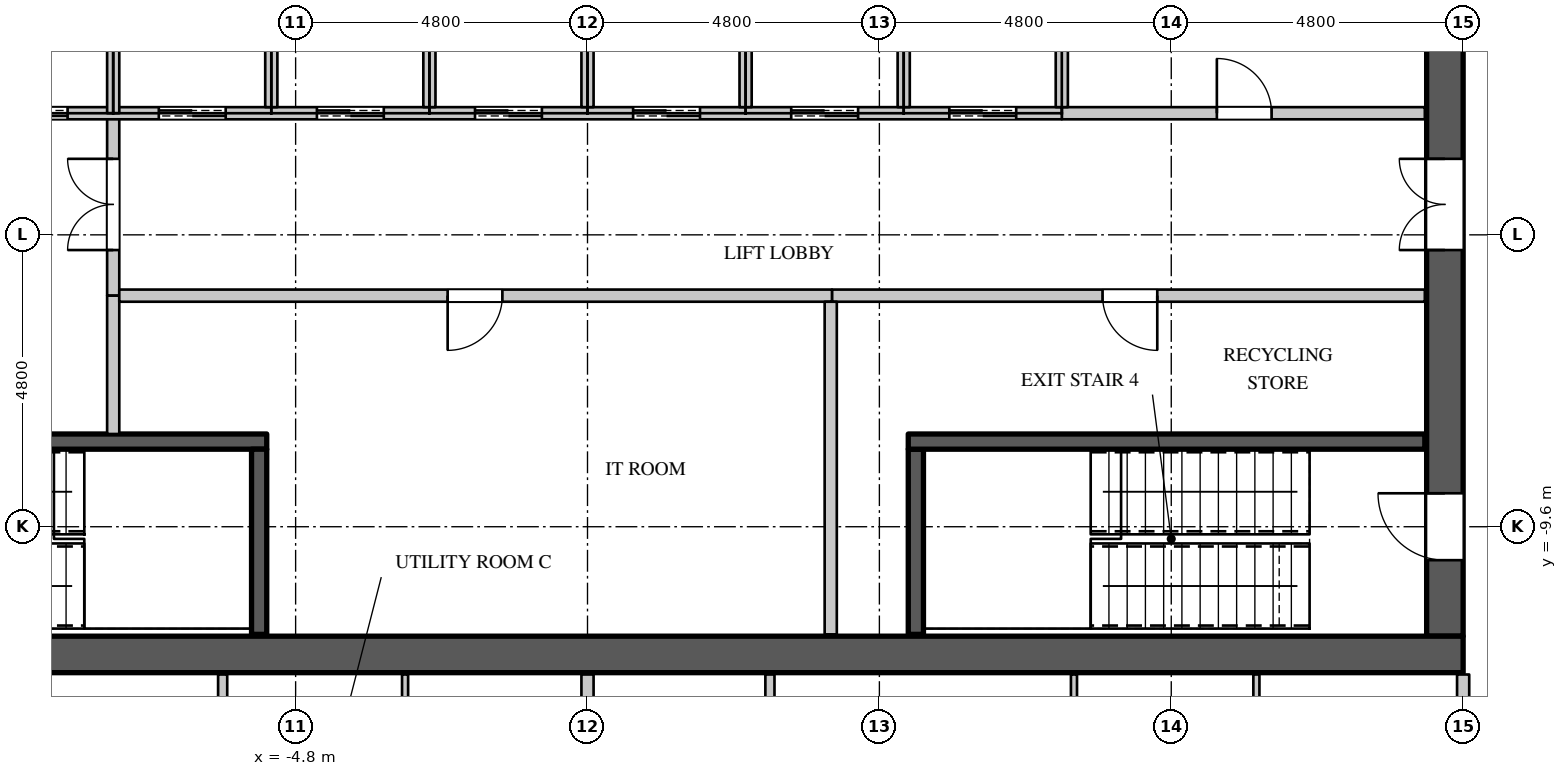
"""IFC4 building model, lengths in metres.
Left out: names, types, materials, properties, quantities, classifications, styles, units other than length and angle.
Written with IfcOpenShell. Run it as: python <this file> out.ifc"""

import sys

from ifc_helpers import new_model, si_unit, direction, frame, frame_2d, origin, place, context, subcontext, project, spatial, rectangle, extrude, element, fill, save


model = new_model("IFC4")
c1 = context("Model", 3, precision=1e-05, world=origin(), true_north=direction((0.0, 1.0)))
c2 = subcontext(c1, "Body", "Model", "MODEL_VIEW")
j1 = project(units=[si_unit("LENGTHUNIT", "METRE"), si_unit("PLANEANGLEUNIT", "RADIAN")], contexts=[c1])
p1 = place(None, origin())
s1 = spatial("IfcSite", under=j1, at=p1, CompositionType="ELEMENT")
p2 = place(p1, origin())
s2 = spatial("IfcBuilding", under=s1, at=p2, CompositionType="ELEMENT")
p3 = place(p2, frame((0.0, 0.0, 272.7)))
s3 = spatial("IfcBuildingStorey", under=s2, at=p3, CompositionType="ELEMENT", Elevation=272.7)
p4 = place(p3, frame((-14.4, -11.7, 0.0), z_axis=(0.0, 0.0, 1.0), x_axis=(1.0, 0.0, 0.0)))
e1 = element("IfcWall", 1, at=p4, inside=s3, PredefinedType="SHEAR", context=c2, shape_type="SweptSolid", body=[
    extrude(rectangle(XDim=28.8, YDim=0.6, at=frame_2d((14.4, 0.0))), origin(), (0.0, 0.0, 1.0), 4.2),
])
p5 = place(p3, frame((14.1, -11.4, 0.0), z_axis=(0.0, 0.0, 1.0), x_axis=(0.0, 1.0, 0.0)))
e2 = element("IfcWall", 2, at=p5, inside=s3, PredefinedType="SHEAR", context=c2, shape_type="SweptSolid", body=[
    extrude(rectangle(XDim=22.8, YDim=0.6, at=frame_2d((11.4, 0.0))), origin(), (0.0, 0.0, 1.0), 4.2),
])
p6 = place(p5, frame((20.45, 0.0, 0.0)))
e3 = element("IfcOpeningElement", 3, at=p6, cuts=e2, PredefinedType="OPENING", context=c2, shape_type="SweptSolid", body=[
    extrude(rectangle(XDim=1.1, YDim=2.2, at=frame_2d((0.55, 1.1))), frame((0.0, 0.31, 0.0), z_axis=(0.0, -1.0, 0.0), x_axis=(1.0, 0.0, 0.0)), (0.0, 0.0, 1.0), 0.62),
])
p7 = place(p5, frame((1.25, 0.0, 0.0)))
e4 = element("IfcOpeningElement", 4, at=p7, cuts=e2, PredefinedType="OPENING", context=c2, shape_type="SweptSolid", body=[
    extrude(rectangle(XDim=1.1, YDim=2.2, at=frame_2d((0.55, 1.1))), frame((0.0, 0.31, 0.0), z_axis=(0.0, -1.0, 0.0), x_axis=(1.0, 0.0, 0.0)), (0.0, 0.0, 1.0), 0.62),
])
p8 = place(p5, frame((14.95, 0.0, 0.0)))
e5 = element("IfcOpeningElement", 5, at=p8, cuts=e2, PredefinedType="OPENING", context=c2, shape_type="SweptSolid", body=[
    extrude(rectangle(XDim=1.5, YDim=2.4, at=frame_2d((0.75, 1.2))), frame((0.0, 0.31, 0.0), z_axis=(0.0, -1.0, 0.0), x_axis=(1.0, 0.0, 0.0)), (0.0, 0.0, 1.0), 0.62),
])
p9 = place(p5, frame((6.35, 0.0, 0.0)))
e6 = element("IfcOpeningElement", 6, at=p9, cuts=e2, PredefinedType="OPENING", context=c2, shape_type="SweptSolid", body=[
    extrude(rectangle(XDim=1.5, YDim=2.4, at=frame_2d((0.75, 1.2))), frame((0.0, 0.31, 0.0), z_axis=(0.0, -1.0, 0.0), x_axis=(1.0, 0.0, 0.0)), (0.0, 0.0, 1.0), 0.62),
])
p10 = place(p3, frame((-7.8, -5.8, 0.0), z_axis=(0.0, 0.0, 1.0), x_axis=(0.0, 1.0, 0.0)))
e7 = element("IfcWall", 7, at=p10, inside=s3, PredefinedType="PARTITIONING", context=c2, shape_type="SweptSolid", body=[
    extrude(rectangle(XDim=3.0, YDim=0.2, at=frame_2d((1.5, 0.0))), origin(), (0.0, 0.0, 1.0), 3.95),
])
p11 = place(p10, frame((0.75, 0.0, 0.0)))
e8 = element("IfcOpeningElement", 8, at=p11, cuts=e7, PredefinedType="OPENING", context=c2, shape_type="SweptSolid", body=[
    extrude(rectangle(XDim=1.5, YDim=2.4, at=frame_2d((0.75, 1.2))), frame((0.0, 0.11, 0.0), z_axis=(0.0, -1.0, 0.0), x_axis=(1.0, 0.0, 0.0)), (0.0, 0.0, 1.0), 0.22),
])
p12 = place(p3, frame((4.02, -5.8, 0.0), z_axis=(0.0, 0.0, 1.0), x_axis=(1.0, 0.0, 0.0)))
e9 = element("IfcWall", 9, at=p12, inside=s3, PredefinedType="PARTITIONING", context=c2, shape_type="SweptSolid", body=[
    extrude(rectangle(XDim=9.75, YDim=0.2, at=frame_2d((4.875, 0.0))), origin(), (0.0, 0.0, 1.0), 3.95),
])
p13 = place(p12, frame((4.45, 0.0, 0.0)))
e10 = element("IfcOpeningElement", 10, at=p13, cuts=e9, PredefinedType="OPENING", context=c2, shape_type="SweptSolid", body=[
    extrude(rectangle(XDim=0.9, YDim=2.2, at=frame_2d((0.45, 1.1))), frame((0.0, 0.11, 0.0), z_axis=(0.0, -1.0, 0.0), x_axis=(1.0, 0.0, 0.0)), (0.0, 0.0, 1.0), 0.22),
])
p14 = place(p3, frame((14.4, -14.3, 0.0), z_axis=(0.0, 0.0, 1.0), x_axis=(0.0, 1.0, 0.0)))
e11 = element("IfcWall", 11, at=p14, inside=s3, PredefinedType="PARTITIONING", context=c2, shape_type="SweptSolid", body=[
    extrude(rectangle(XDim=2.27, YDim=0.2, at=frame_2d((1.135, 0.0))), origin(), (0.0, 0.0, 1.0), 3.95),
])
p15 = place(p3, frame((-6.0, -17.925, 0.0), z_axis=(0.0, 0.0, 1.0), x_axis=(0.0, 1.0, 0.0)))
e12 = element("IfcWall", 12, at=p15, inside=s3, PredefinedType="PARTITIONING", context=c2, shape_type="SweptSolid", body=[
    extrude(rectangle(XDim=5.895, YDim=0.15, at=frame_2d((2.948, 0.0))), origin(), (0.0, 0.0, 1.0), 3.95),
])
p16 = place(p15, frame((2.5, 0.0, 0.0)))
e13 = element("IfcOpeningElement", 13, at=p16, cuts=e12, PredefinedType="OPENING", context=c2, shape_type="SweptSolid", body=[
    extrude(rectangle(XDim=0.9, YDim=2.2, at=frame_2d((0.45, 1.1))), frame((0.0, 0.085, 0.0), z_axis=(0.0, -1.0, 0.0), x_axis=(1.0, 0.0, 0.0)), (0.0, 0.0, 1.0), 0.17),
])
p17 = place(p3, frame((3.0, -17.925, 0.0), z_axis=(0.0, 0.0, 1.0), x_axis=(0.0, 1.0, 0.0)))
e14 = element("IfcWall", 14, at=p17, inside=s3, PredefinedType="PARTITIONING", context=c2, shape_type="SweptSolid", body=[
    extrude(rectangle(XDim=5.895, YDim=0.15, at=frame_2d((2.948, 0.0))), origin(), (0.0, 0.0, 1.0), 3.95),
])
p18 = place(p3, frame((0.0, -26.455, 0.0), z_axis=(0.0, 0.0, 1.0), x_axis=(0.0, 1.0, 0.0)))
e15 = element("IfcWall", 15, at=p18, inside=s3, PredefinedType="PARTITIONING", context=c2, shape_type="SweptSolid", body=[
    extrude(rectangle(XDim=14.425, YDim=0.2, at=frame_2d((7.212, 0.0))), origin(), (0.0, 0.0, 1.0), 3.95),
])
p19 = place(p3, frame((-7.8, -8.075, 0.0), z_axis=(0.0, 0.0, 1.0), x_axis=(0.0, 1.0, 0.0)))
e16 = element("IfcWall", 16, at=p19, inside=s3, PredefinedType="PARTITIONING", context=c2, shape_type="SweptSolid", body=[
    extrude(rectangle(XDim=2.275, YDim=0.2, at=frame_2d((1.137, 0.0))), origin(), (0.0, 0.0, 1.0), 3.95),
])
p20 = place(p3, frame((-7.7, -5.8, 0.0), z_axis=(0.0, 0.0, 1.0), x_axis=(1.0, 0.0, 0.0)))
e17 = element("IfcWall", 17, at=p20, inside=s3, PredefinedType="PARTITIONING", context=c2, shape_type="SweptSolid", body=[
    extrude(rectangle(XDim=11.72, YDim=0.2, at=frame_2d((5.86, 0.0))), origin(), (0.0, 0.0, 1.0), 3.95),
])
p21 = place(p20, frame((5.4, 0.0, 0.0)))
e18 = element("IfcOpeningElement", 18, at=p21, cuts=e17, PredefinedType="OPENING", context=c2, shape_type="SweptSolid", body=[
    extrude(rectangle(XDim=0.9, YDim=2.2, at=frame_2d((0.45, 1.1))), frame((0.0, 0.11, 0.0), z_axis=(0.0, -1.0, 0.0), x_axis=(1.0, 0.0, 0.0)), (0.0, 0.0, 1.0), 0.22),
])
p22 = place(p3, frame((4.0, -11.37, 0.0), z_axis=(0.0, 0.0, 1.0), x_axis=(0.0, 1.0, 0.0)))
e19 = element("IfcWall", 19, at=p22, inside=s3, PredefinedType="PARTITIONING", context=c2, shape_type="SweptSolid", body=[
    extrude(rectangle(XDim=5.47, YDim=0.2, at=frame_2d((2.735, 0.0))), origin(), (0.0, 0.0, 1.0), 3.95),
])
p23 = place(p3, frame((7.8, -2.8, 0.0), z_axis=(0.0, 0.0, 1.0), x_axis=(1.0, 0.0, 0.0)))
e20 = element("IfcWall", 20, at=p23, inside=s3, PredefinedType="PARTITIONING", context=c2, shape_type="SweptSolid", body=[
    extrude(rectangle(XDim=5.97, YDim=0.2, at=frame_2d((2.985, 0.0))), origin(), (0.0, 0.0, 1.0), 3.95),
])
p24 = place(p23, frame((2.55, 0.0, 0.0)))
e21 = element("IfcOpeningElement", 21, at=p24, cuts=e20, PredefinedType="OPENING", context=c2, shape_type="SweptSolid", body=[
    extrude(rectangle(XDim=0.9, YDim=2.2, at=frame_2d((0.45, 1.1))), frame((0.0, 0.11, 0.0), z_axis=(0.0, -1.0, 0.0), x_axis=(1.0, 0.0, 0.0)), (0.0, 0.0, 1.0), 0.22),
])
p25 = place(p3, frame((-10.4, -2.8, 0.0), z_axis=(0.0, 0.0, 1.0), x_axis=(1.0, 0.0, 0.0)))
e22 = element("IfcWall", 22, at=p25, inside=s3, PredefinedType="PARTITIONING", context=c2, shape_type="SweptSolid", body=[
    extrude(rectangle(XDim=18.2, YDim=0.2, at=frame_2d((9.1, 0.0))), origin(), (0.0, 0.0, 1.0), 3.95),
])
p26 = place(p25, frame((0.75, 0.0, 0.0)))
e23 = element("IfcOpeningElement", 23, at=p26, cuts=e22, PredefinedType="OPENING", context=c2, shape_type="SweptSolid", body=[
    extrude(rectangle(XDim=1.1, YDim=2.2, at=frame_2d((0.55, 1.1))), frame((0.0, 0.11, 0.0), z_axis=(0.0, -1.0, 0.0), x_axis=(1.0, 0.0, 0.0)), (0.0, 0.0, 1.0), 0.22),
])
p27 = place(p25, frame((3.35, 0.0, 0.0)))
e24 = element("IfcOpeningElement", 24, at=p27, cuts=e22, PredefinedType="OPENING", context=c2, shape_type="SweptSolid", body=[
    extrude(rectangle(XDim=1.1, YDim=2.2, at=frame_2d((0.55, 1.1))), frame((0.0, 0.11, 0.0), z_axis=(0.0, -1.0, 0.0), x_axis=(1.0, 0.0, 0.0)), (0.0, 0.0, 1.0), 0.22),
])
p28 = place(p25, frame((5.95, 0.0, 0.0)))
e25 = element("IfcOpeningElement", 25, at=p28, cuts=e22, PredefinedType="OPENING", context=c2, shape_type="SweptSolid", body=[
    extrude(rectangle(XDim=1.1, YDim=2.2, at=frame_2d((0.55, 1.1))), frame((0.0, 0.11, 0.0), z_axis=(0.0, -1.0, 0.0), x_axis=(1.0, 0.0, 0.0)), (0.0, 0.0, 1.0), 0.22),
])
p29 = place(p25, frame((8.55, 0.0, 0.0)))
e26 = element("IfcOpeningElement", 26, at=p29, cuts=e22, PredefinedType="OPENING", context=c2, shape_type="SweptSolid", body=[
    extrude(rectangle(XDim=1.1, YDim=2.2, at=frame_2d((0.55, 1.1))), frame((0.0, 0.11, 0.0), z_axis=(0.0, -1.0, 0.0), x_axis=(1.0, 0.0, 0.0)), (0.0, 0.0, 1.0), 0.22),
])
p30 = place(p25, frame((11.15, 0.0, 0.0)))
e27 = element("IfcOpeningElement", 27, at=p30, cuts=e22, PredefinedType="OPENING", context=c2, shape_type="SweptSolid", body=[
    extrude(rectangle(XDim=1.1, YDim=2.2, at=frame_2d((0.55, 1.1))), frame((0.0, 0.11, 0.0), z_axis=(0.0, -1.0, 0.0), x_axis=(1.0, 0.0, 0.0)), (0.0, 0.0, 1.0), 0.22),
])
p31 = place(p25, frame((13.75, 0.0, 0.0)))
e28 = element("IfcOpeningElement", 28, at=p31, cuts=e22, PredefinedType="OPENING", context=c2, shape_type="SweptSolid", body=[
    extrude(rectangle(XDim=1.1, YDim=2.2, at=frame_2d((0.55, 1.1))), frame((0.0, 0.11, 0.0), z_axis=(0.0, -1.0, 0.0), x_axis=(1.0, 0.0, 0.0)), (0.0, 0.0, 1.0), 0.22),
])
p32 = place(p25, frame((16.35, 0.0, 0.0)))
e29 = element("IfcOpeningElement", 29, at=p32, cuts=e22, PredefinedType="OPENING", context=c2, shape_type="SweptSolid", body=[
    extrude(rectangle(XDim=1.1, YDim=2.2, at=frame_2d((0.55, 1.1))), frame((0.0, 0.11, 0.0), z_axis=(0.0, -1.0, 0.0), x_axis=(1.0, 0.0, 0.0)), (0.0, 0.0, 1.0), 0.22),
])
p33 = place(p3, frame((-7.8, -2.8, 0.0), z_axis=(0.0, 0.0, 1.0), x_axis=(0.0, 1.0, 0.0)))
e30 = element("IfcWall", 30, at=p33, inside=s3, PredefinedType="PARTITIONING", context=c2, shape_type="SweptSolid", body=[
    extrude(rectangle(XDim=2.8, YDim=0.2, at=frame_2d((1.4, 0.0))), origin(), (0.0, 0.0, 1.0), 3.95),
])
for number, where, z_axis, x_axis in (
    (31, (-5.2, -2.7, 0.0), (0.0, 0.0, 1.0), (0.0, 1.0, 0.0)),
    (32, (-2.6, -2.7, 0.0), (0.0, 0.0, 1.0), (0.0, 1.0, 0.0)),
    (33, (0.0, -2.7, 0.0), (0.0, 0.0, 1.0), (0.0, 1.0, 0.0)),
    (34, (2.6, -2.7, 0.0), (0.0, 0.0, 1.0), (0.0, 1.0, 0.0)),
    (35, (5.2, -2.7, 0.0), (0.0, 0.0, 1.0), (0.0, 1.0, 0.0)),
    (36, (7.8, -2.7, 0.0), (0.0, 0.0, 1.0), (0.0, 1.0, 0.0)),
):
    element("IfcWall", number, at=place(p3, frame(where, z_axis=z_axis, x_axis=x_axis)), inside=s3, PredefinedType="PARTITIONING", context=c2, shape_type="SweptSolid", body=[
        extrude(rectangle(XDim=2.6, YDim=0.2, at=frame_2d((1.3, 0.0))), origin(), (0.0, 0.0, 1.0), 3.95),
    ])
p34 = place(p3, frame((-13.77, -8.2, 0.0), z_axis=(0.0, 0.0, 1.0), x_axis=(1.0, 0.0, 0.0)))
e37 = element("IfcWall", 37, at=p34, inside=s3, PredefinedType="SHEAR", context=c2, shape_type="SweptSolid", body=[
    extrude(rectangle(XDim=8.495, YDim=0.25, at=frame_2d((4.248, 0.0))), origin(), (0.0, 0.0, 1.0), 3.95),
])
p35 = place(p34, frame((0.15, 0.0, 0.0)))
e38 = element("IfcOpeningElement", 38, at=p35, cuts=e37, PredefinedType="OPENING", context=c2, shape_type="SweptSolid", body=[
    extrude(rectangle(XDim=1.1, YDim=2.2, at=frame_2d((0.55, 1.1))), frame((0.0, 0.135, 0.0), z_axis=(0.0, -1.0, 0.0), x_axis=(1.0, 0.0, 0.0)), (0.0, 0.0, 1.0), 0.27),
])
for number, where, z_axis, x_axis in (
    (39, (-5.4, -11.37, 0.0), (0.0, 0.0, 1.0), (0.0, 1.0, 0.0)),
    (40, (5.4, -11.37, 0.0), (0.0, 0.0, 1.0), (0.0, 1.0, 0.0)),
):
    element("IfcWall", number, at=place(p3, frame(where, z_axis=z_axis, x_axis=x_axis)), inside=s3, PredefinedType="SHEAR", context=c2, shape_type="SweptSolid", body=[
        extrude(rectangle(XDim=3.045, YDim=0.25, at=frame_2d((1.522, 0.0))), origin(), (0.0, 0.0, 1.0), 3.95),
    ])
p36 = place(p3, frame((5.275, -8.2, 0.0), z_axis=(0.0, 0.0, 1.0), x_axis=(1.0, 0.0, 0.0)))
e41 = element("IfcWall", 41, at=p36, inside=s3, PredefinedType="SHEAR", context=c2, shape_type="SweptSolid", body=[
    extrude(rectangle(XDim=8.495, YDim=0.25, at=frame_2d((4.248, 0.0))), origin(), (0.0, 0.0, 1.0), 3.95),
])
p37 = place(p3, frame((-3.0, -17.425, 0.0), z_axis=(0.0, 0.0, 1.0), x_axis=(0.0, 1.0, 0.0)))
e42 = element("IfcWall", 42, at=p37, inside=s3, PredefinedType="PARTITIONING", context=c2, shape_type="SweptSolid", body=[
    extrude(rectangle(XDim=5.395, YDim=0.1, at=frame_2d((2.698, 0.0))), origin(), (0.0, 0.0, 1.0), 3.95),
])
p38 = place(p3, frame((8.0, -18.425, 0.0), z_axis=(0.0, 0.0, 1.0), x_axis=(0.0, 1.0, 0.0)))
e43 = element("IfcWall", 43, at=p38, inside=s3, PredefinedType="PARTITIONING", context=c2, shape_type="SweptSolid", body=[
    extrude(rectangle(XDim=6.395, YDim=0.1, at=frame_2d((3.198, 0.0))), origin(), (0.0, 0.0, 1.0), 3.95),
])
p39 = place(p38, frame((2.75, 0.0, 0.0)))
e44 = element("IfcOpeningElement", 44, at=p39, cuts=e43, PredefinedType="OPENING", context=c2, shape_type="SweptSolid", body=[
    extrude(rectangle(XDim=0.9, YDim=2.2, at=frame_2d((0.45, 1.1))), frame((0.0, 0.06, 0.0), z_axis=(0.0, -1.0, 0.0), x_axis=(1.0, 0.0, 0.0)), (0.0, 0.0, 1.0), 0.12),
])
p40 = place(p3, frame((11.0, -18.425, 0.0), z_axis=(0.0, 0.0, 1.0), x_axis=(0.0, 1.0, 0.0)))
e45 = element("IfcWall", 45, at=p40, inside=s3, PredefinedType="PARTITIONING", context=c2, shape_type="SweptSolid", body=[
    extrude(rectangle(XDim=6.395, YDim=0.1, at=frame_2d((3.198, 0.0))), origin(), (0.0, 0.0, 1.0), 3.95),
])
p41 = place(p24, origin())
e46 = element("IfcDoor", 46, at=p41, inside=s3, OperationType="SINGLE_SWING_LEFT", PredefinedType="DOOR", context=c2, shape_type="SweptSolid", body=[
    extrude(rectangle(XDim=0.9, YDim=2.2, at=frame_2d((0.45, 1.1))), frame((0.0, 0.025, 0.0), z_axis=(0.0, -1.0, 0.0), x_axis=(1.0, 0.0, 0.0)), (0.0, 0.0, 1.0), 0.05),
])
fill(e21, e46)
p42 = place(p21, origin())
e47 = element("IfcDoor", 47, at=p42, inside=s3, OperationType="SINGLE_SWING_RIGHT", PredefinedType="DOOR", context=c2, shape_type="SweptSolid", body=[
    extrude(rectangle(XDim=0.9, YDim=2.2, at=frame_2d((0.45, 1.1))), frame((0.0, 0.025, 0.0), z_axis=(0.0, -1.0, 0.0), x_axis=(1.0, 0.0, 0.0)), (0.0, 0.0, 1.0), 0.05),
])
fill(e18, e47)
p43 = place(p13, origin())
e48 = element("IfcDoor", 48, at=p43, inside=s3, OperationType="SINGLE_SWING_LEFT", PredefinedType="DOOR", context=c2, shape_type="SweptSolid", body=[
    extrude(rectangle(XDim=0.9, YDim=2.2, at=frame_2d((0.45, 1.1))), frame((0.0, 0.025, 0.0), z_axis=(0.0, -1.0, 0.0), x_axis=(1.0, 0.0, 0.0)), (0.0, 0.0, 1.0), 0.05),
])
fill(e10, e48)
p44 = place(p26, origin())
e49 = element("IfcDoor", 49, at=p44, inside=s3, OperationType="DOUBLE_DOOR_SLIDING", PredefinedType="DOOR", context=c2, shape_type="SweptSolid", body=[
    extrude(rectangle(XDim=1.1, YDim=2.2, at=frame_2d((0.55, 1.1))), frame((0.0, 0.025, 0.0), z_axis=(0.0, -1.0, 0.0), x_axis=(1.0, 0.0, 0.0)), (0.0, 0.0, 1.0), 0.05),
])
fill(e23, e49)
p45 = place(p27, origin())
e50 = element("IfcDoor", 50, at=p45, inside=s3, OperationType="DOUBLE_DOOR_SLIDING", PredefinedType="DOOR", context=c2, shape_type="SweptSolid", body=[
    extrude(rectangle(XDim=1.1, YDim=2.2, at=frame_2d((0.55, 1.1))), frame((0.0, 0.025, 0.0), z_axis=(0.0, -1.0, 0.0), x_axis=(1.0, 0.0, 0.0)), (0.0, 0.0, 1.0), 0.05),
])
fill(e24, e50)
p46 = place(p28, origin())
e51 = element("IfcDoor", 51, at=p46, inside=s3, OperationType="DOUBLE_DOOR_SLIDING", PredefinedType="DOOR", context=c2, shape_type="SweptSolid", body=[
    extrude(rectangle(XDim=1.1, YDim=2.2, at=frame_2d((0.55, 1.1))), frame((0.0, 0.025, 0.0), z_axis=(0.0, -1.0, 0.0), x_axis=(1.0, 0.0, 0.0)), (0.0, 0.0, 1.0), 0.05),
])
fill(e25, e51)
p47 = place(p29, origin())
e52 = element("IfcDoor", 52, at=p47, inside=s3, OperationType="DOUBLE_DOOR_SLIDING", PredefinedType="DOOR", context=c2, shape_type="SweptSolid", body=[
    extrude(rectangle(XDim=1.1, YDim=2.2, at=frame_2d((0.55, 1.1))), frame((0.0, 0.025, 0.0), z_axis=(0.0, -1.0, 0.0), x_axis=(1.0, 0.0, 0.0)), (0.0, 0.0, 1.0), 0.05),
])
fill(e26, e52)
p48 = place(p30, origin())
e53 = element("IfcDoor", 53, at=p48, inside=s3, OperationType="DOUBLE_DOOR_SLIDING", PredefinedType="DOOR", context=c2, shape_type="SweptSolid", body=[
    extrude(rectangle(XDim=1.1, YDim=2.2, at=frame_2d((0.55, 1.1))), frame((0.0, 0.025, 0.0), z_axis=(0.0, -1.0, 0.0), x_axis=(1.0, 0.0, 0.0)), (0.0, 0.0, 1.0), 0.05),
])
fill(e27, e53)
p49 = place(p31, origin())
e54 = element("IfcDoor", 54, at=p49, inside=s3, OperationType="DOUBLE_DOOR_SLIDING", PredefinedType="DOOR", context=c2, shape_type="SweptSolid", body=[
    extrude(rectangle(XDim=1.1, YDim=2.2, at=frame_2d((0.55, 1.1))), frame((0.0, 0.025, 0.0), z_axis=(0.0, -1.0, 0.0), x_axis=(1.0, 0.0, 0.0)), (0.0, 0.0, 1.0), 0.05),
])
fill(e28, e54)
p50 = place(p32, origin())
e55 = element("IfcDoor", 55, at=p50, inside=s3, OperationType="DOUBLE_DOOR_SLIDING", PredefinedType="DOOR", context=c2, shape_type="SweptSolid", body=[
    extrude(rectangle(XDim=1.1, YDim=2.2, at=frame_2d((0.55, 1.1))), frame((0.0, 0.025, 0.0), z_axis=(0.0, -1.0, 0.0), x_axis=(1.0, 0.0, 0.0)), (0.0, 0.0, 1.0), 0.05),
])
fill(e29, e55)
p51 = place(p11, origin())
e56 = element("IfcDoor", 56, at=p51, inside=s3, OperationType="DOUBLE_DOOR_SINGLE_SWING", PredefinedType="DOOR", context=c2, shape_type="SweptSolid", body=[
    extrude(rectangle(XDim=1.5, YDim=2.4, at=frame_2d((0.75, 1.2))), frame((0.0, 0.025, 0.0), z_axis=(0.0, -1.0, 0.0), x_axis=(1.0, 0.0, 0.0)), (0.0, 0.0, 1.0), 0.05),
])
fill(e8, e56)
p52 = place(p7, origin())
e57 = element("IfcDoor", 57, at=p52, inside=s3, OperationType="SINGLE_SWING_RIGHT", PredefinedType="DOOR", context=c2, shape_type="SweptSolid", body=[
    extrude(rectangle(XDim=1.1, YDim=2.2, at=frame_2d((0.55, 1.1))), frame((0.0, 0.295, 0.0), z_axis=(0.0, -1.0, 0.0), x_axis=(1.0, 0.0, 0.0)), (0.0, 0.0, 1.0), 0.05),
])
fill(e4, e57)
p53 = place(p9, origin())
e58 = element("IfcDoor", 58, at=p53, inside=s3, OperationType="DOUBLE_DOOR_SINGLE_SWING", PredefinedType="DOOR", context=c2, shape_type="SweptSolid", body=[
    extrude(rectangle(XDim=1.5, YDim=2.4, at=frame_2d((0.75, 1.2))), frame((0.0, 0.295, 0.0), z_axis=(0.0, -1.0, 0.0), x_axis=(1.0, 0.0, 0.0)), (0.0, 0.0, 1.0), 0.05),
])
fill(e6, e58)
save(model, sys.argv[1])
